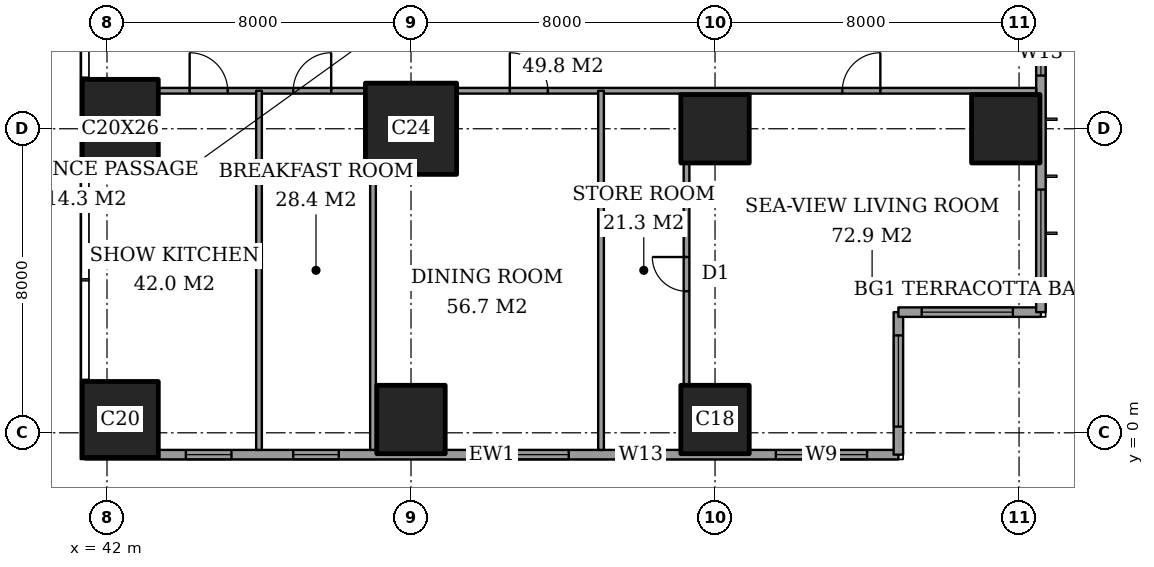
"""IFC4 building model, lengths in metres.
Left out: names, types, materials, properties, quantities, classifications, styles, units other than length and angle.
Written with IfcOpenShell. Run it as: python <this file> out.ifc"""

import sys

from ifc_helpers import new_model, si_unit, direction, frame, frame_2d, origin, origin_2d, place, context, subcontext, project, spatial, rectangle, extrude, element, fill, save


model = new_model("IFC4")
c1 = context("Model", 3, precision=1e-05, world=origin(), true_north=direction((0.0, 1.0)))
c2 = subcontext(c1, "Body", "Model", "MODEL_VIEW")
j1 = project(units=[si_unit("LENGTHUNIT", "METRE"), si_unit("PLANEANGLEUNIT", "RADIAN")], contexts=[c1])
p1 = place(None, origin())
s1 = spatial("IfcSite", under=j1, at=p1, CompositionType="ELEMENT")
p2 = place(p1, origin())
s2 = spatial("IfcBuilding", under=s1, at=p2, CompositionType="ELEMENT")
p3 = place(p2, frame((0.0, 0.0, 221.8)))
s3 = spatial("IfcBuildingStorey", under=s2, at=p3, CompositionType="ELEMENT", Elevation=221.8)
p4 = place(p3, frame((42.35, 0.35, 0.0), z_axis=(0.0, 0.0, 1.0), x_axis=(1.0, 0.0, 0.0)))
e1 = element("IfcColumn", 1, at=p4, inside=s3, PredefinedType="COLUMN", context=c2, shape_type="SweptSolid", body=[
    extrude(rectangle(XDim=2.0, YDim=2.0, at=origin_2d()), origin(), (0.0, 0.0, 1.0), 3.6),
])
p5 = place(p3, frame((42.35, 8.0, 0.0), z_axis=(0.0, 0.0, 1.0), x_axis=(1.0, 0.0, 0.0)))
e2 = element("IfcColumn", 2, at=p5, inside=s3, PredefinedType="COLUMN", context=c2, shape_type="SweptSolid", body=[
    extrude(rectangle(XDim=2.0, YDim=2.6, at=origin_2d()), origin(), (0.0, 0.0, 1.0), 3.6),
])
p6 = place(p3, frame((50.0, 0.35, 0.0), z_axis=(0.0, 0.0, 1.0), x_axis=(1.0, 0.0, 0.0)))
e3 = element("IfcColumn", 3, at=p6, inside=s3, PredefinedType="COLUMN", context=c2, shape_type="SweptSolid", body=[
    extrude(rectangle(XDim=1.8, YDim=1.8, at=origin_2d()), origin(), (0.0, 0.0, 1.0), 3.6),
])
p7 = place(p3, frame((50.0, 8.0, 0.0), z_axis=(0.0, 0.0, 1.0), x_axis=(1.0, 0.0, 0.0)))
e4 = element("IfcColumn", 4, at=p7, inside=s3, PredefinedType="COLUMN", context=c2, shape_type="SweptSolid", body=[
    extrude(rectangle(XDim=2.4, YDim=2.4, at=origin_2d()), origin(), (0.0, 0.0, 1.0), 3.6),
])
for number, where, z_axis, x_axis in (
    (5, (58.0, 0.35, 0.0), (0.0, 0.0, 1.0), (1.0, 0.0, 0.0)),
    (6, (58.0, 8.0, 0.0), (0.0, 0.0, 1.0), (1.0, 0.0, 0.0)),
    (7, (65.65, 8.0, 0.0), (0.0, 0.0, 1.0), (1.0, 0.0, 0.0)),
):
    element("IfcColumn", number, at=place(p3, frame(where, z_axis=z_axis, x_axis=x_axis)), inside=s3, PredefinedType="COLUMN", context=c2, shape_type="SweptSolid", body=[
        extrude(rectangle(XDim=1.8, YDim=1.8, at=origin_2d()), origin(), (0.0, 0.0, 1.0), 3.6),
    ])
p8 = place(p3, frame((41.425, -0.575, 0.0), z_axis=(0.0, 0.0, 1.0), x_axis=(1.0, 0.0, 0.0)))
e8 = element("IfcWall", 8, at=p8, inside=s3, PredefinedType="SOLIDWALL", context=c2, shape_type="SweptSolid", body=[
    extrude(rectangle(XDim=21.4, YDim=0.25, at=frame_2d((10.7, 0.0))), origin(), (0.0, 0.0, 1.0), 3.6),
])
p9 = place(p8, frame((2.65, 0.0, 0.2)))
e9 = element("IfcOpeningElement", 9, at=p9, cuts=e8, PredefinedType="OPENING", context=c2, shape_type="SweptSolid", body=[
    extrude(rectangle(XDim=1.2, YDim=2.4, at=frame_2d((0.6, 1.2))), frame((0.0, 0.135, 0.0), z_axis=(0.0, -1.0, 0.0), x_axis=(1.0, 0.0, 0.0)), (0.0, 0.0, 1.0), 0.27),
])
p10 = place(p8, frame((5.475, 0.0, 0.2)))
e10 = element("IfcOpeningElement", 10, at=p10, cuts=e8, PredefinedType="OPENING", context=c2, shape_type="SweptSolid", body=[
    extrude(rectangle(XDim=1.2, YDim=2.4, at=frame_2d((0.6, 1.2))), frame((0.0, 0.135, 0.0), z_axis=(0.0, -1.0, 0.0), x_axis=(1.0, 0.0, 0.0)), (0.0, 0.0, 1.0), 0.27),
])
p11 = place(p8, frame((10.325, 0.0, 0.2)))
e11 = element("IfcOpeningElement", 11, at=p11, cuts=e8, PredefinedType="OPENING", context=c2, shape_type="SweptSolid", body=[
    extrude(rectangle(XDim=2.4, YDim=2.4, at=frame_2d((1.2, 1.2))), frame((0.0, 0.135, 0.0), z_axis=(0.0, -1.0, 0.0), x_axis=(1.0, 0.0, 0.0)), (0.0, 0.0, 1.0), 0.27),
])
p12 = place(p8, frame((14.025, 0.0, 0.2)))
e12 = element("IfcOpeningElement", 12, at=p12, cuts=e8, PredefinedType="OPENING", context=c2, shape_type="SweptSolid", body=[
    extrude(rectangle(XDim=1.2, YDim=2.4, at=frame_2d((0.6, 1.2))), frame((0.0, 0.135, 0.0), z_axis=(0.0, -1.0, 0.0), x_axis=(1.0, 0.0, 0.0)), (0.0, 0.0, 1.0), 0.27),
])
p13 = place(p8, frame((18.175, 0.0, 0.2)))
e13 = element("IfcOpeningElement", 13, at=p13, cuts=e8, PredefinedType="OPENING", context=c2, shape_type="SweptSolid", body=[
    extrude(rectangle(XDim=2.4, YDim=2.4, at=frame_2d((1.2, 1.2))), frame((0.0, 0.135, 0.0), z_axis=(0.0, -1.0, 0.0), x_axis=(1.0, 0.0, 0.0)), (0.0, 0.0, 1.0), 0.27),
])
p14 = place(p3, frame((62.825, -0.575, 0.0), z_axis=(0.0, 0.0, 1.0), x_axis=(0.0, 1.0, 0.0)))
e14 = element("IfcWall", 14, at=p14, inside=s3, PredefinedType="SOLIDWALL", context=c2, shape_type="SweptSolid", body=[
    extrude(rectangle(XDim=3.75, YDim=0.25, at=frame_2d((1.875, 0.0))), origin(), (0.0, 0.0, 1.0), 3.6),
])
p15 = place(p14, frame((0.738, 0.0, 0.2)))
e15 = element("IfcOpeningElement", 15, at=p15, cuts=e14, PredefinedType="OPENING", context=c2, shape_type="SweptSolid", body=[
    extrude(rectangle(XDim=2.4, YDim=2.4, at=frame_2d((1.2, 1.2))), frame((0.0, 0.135, 0.0), z_axis=(0.0, -1.0, 0.0), x_axis=(1.0, 0.0, 0.0)), (0.0, 0.0, 1.0), 0.27),
])
p16 = place(p3, frame((62.825, 3.175, 0.0), z_axis=(0.0, 0.0, 1.0), x_axis=(1.0, 0.0, 0.0)))
e16 = element("IfcWall", 16, at=p16, inside=s3, PredefinedType="SOLIDWALL", context=c2, shape_type="SweptSolid", body=[
    extrude(rectangle(XDim=3.75, YDim=0.25, at=frame_2d((1.875, 0.0))), origin(), (0.0, 0.0, 1.0), 3.6),
])
p17 = place(p16, frame((0.613, 0.0, 0.2)))
e17 = element("IfcOpeningElement", 17, at=p17, cuts=e16, PredefinedType="OPENING", context=c2, shape_type="SweptSolid", body=[
    extrude(rectangle(XDim=2.4, YDim=2.4, at=frame_2d((1.2, 1.2))), frame((0.0, 0.135, 0.0), z_axis=(0.0, -1.0, 0.0), x_axis=(1.0, 0.0, 0.0)), (0.0, 0.0, 1.0), 0.27),
])
p18 = place(p3, frame((66.575, 3.175, 0.0), z_axis=(0.0, 0.0, 1.0), x_axis=(0.0, 1.0, 0.0)))
e18 = element("IfcWall", 18, at=p18, inside=s3, PredefinedType="SOLIDWALL", context=c2, shape_type="SweptSolid", body=[
    extrude(rectangle(XDim=41.65, YDim=0.25, at=frame_2d((20.825, 0.0))), origin(), (0.0, 0.0, 1.0), 3.6),
])
p19 = place(p18, frame((0.825, 0.0, 0.2)))
e19 = element("IfcOpeningElement", 19, at=p19, cuts=e18, PredefinedType="OPENING", context=c2, shape_type="SweptSolid", body=[
    extrude(rectangle(XDim=2.4, YDim=2.4, at=frame_2d((1.2, 1.2))), frame((0.0, 0.135, 0.0), z_axis=(0.0, -1.0, 0.0), x_axis=(1.0, 0.0, 0.0)), (0.0, 0.0, 1.0), 0.27),
])
p20 = place(p18, frame((6.225, 0.0, 0.2)))
e20 = element("IfcOpeningElement", 20, at=p20, cuts=e18, PredefinedType="OPENING", context=c2, shape_type="SweptSolid", body=[
    extrude(rectangle(XDim=1.2, YDim=2.4, at=frame_2d((0.6, 1.2))), frame((0.0, 0.135, 0.0), z_axis=(0.0, -1.0, 0.0), x_axis=(1.0, 0.0, 0.0)), (0.0, 0.0, 1.0), 0.27),
])
p21 = place(p18, frame((8.675, 0.0, 0.2)))
e21 = element("IfcOpeningElement", 21, at=p21, cuts=e18, PredefinedType="OPENING", context=c2, shape_type="SweptSolid", body=[
    extrude(rectangle(XDim=2.4, YDim=2.4, at=frame_2d((1.2, 1.2))), frame((0.0, 0.135, 0.0), z_axis=(0.0, -1.0, 0.0), x_axis=(1.0, 0.0, 0.0)), (0.0, 0.0, 1.0), 0.27),
])
p22 = place(p18, frame((15.675, 0.0, 0.2)))
e22 = element("IfcOpeningElement", 22, at=p22, cuts=e18, PredefinedType="OPENING", context=c2, shape_type="SweptSolid", body=[
    extrude(rectangle(XDim=2.4, YDim=2.4, at=frame_2d((1.2, 1.2))), frame((0.0, 0.135, 0.0), z_axis=(0.0, -1.0, 0.0), x_axis=(1.0, 0.0, 0.0)), (0.0, 0.0, 1.0), 0.27),
])
p23 = place(p18, frame((23.575, 0.0, 0.2)))
e23 = element("IfcOpeningElement", 23, at=p23, cuts=e18, PredefinedType="OPENING", context=c2, shape_type="SweptSolid", body=[
    extrude(rectangle(XDim=2.4, YDim=2.4, at=frame_2d((1.2, 1.2))), frame((0.0, 0.135, 0.0), z_axis=(0.0, -1.0, 0.0), x_axis=(1.0, 0.0, 0.0)), (0.0, 0.0, 1.0), 0.27),
])
p24 = place(p18, frame((30.775, 0.0, 0.2)))
e24 = element("IfcOpeningElement", 24, at=p24, cuts=e18, PredefinedType="OPENING", context=c2, shape_type="SweptSolid", body=[
    extrude(rectangle(XDim=2.4, YDim=2.4, at=frame_2d((1.2, 1.2))), frame((0.0, 0.135, 0.0), z_axis=(0.0, -1.0, 0.0), x_axis=(1.0, 0.0, 0.0)), (0.0, 0.0, 1.0), 0.27),
])
p25 = place(p18, frame((34.55, 0.0, 0.2)))
e25 = element("IfcOpeningElement", 25, at=p25, cuts=e18, PredefinedType="OPENING", context=c2, shape_type="SweptSolid", body=[
    extrude(rectangle(XDim=1.2, YDim=2.4, at=frame_2d((0.6, 1.2))), frame((0.0, 0.135, 0.0), z_axis=(0.0, -1.0, 0.0), x_axis=(1.0, 0.0, 0.0)), (0.0, 0.0, 1.0), 0.27),
])
p26 = place(p18, frame((38.425, 0.0, 0.2)))
e26 = element("IfcOpeningElement", 26, at=p26, cuts=e18, PredefinedType="OPENING", context=c2, shape_type="SweptSolid", body=[
    extrude(rectangle(XDim=2.4, YDim=2.4, at=frame_2d((1.2, 1.2))), frame((0.0, 0.135, 0.0), z_axis=(0.0, -1.0, 0.0), x_axis=(1.0, 0.0, 0.0)), (0.0, 0.0, 1.0), 0.27),
])
p27 = place(p3, frame((43.35, 9.0, 0.0), z_axis=(0.0, 0.0, 1.0), x_axis=(1.0, 0.0, 0.0)))
e27 = element("IfcWall", 27, at=p27, inside=s3, PredefinedType="PARTITIONING", context=c2, shape_type="SweptSolid", body=[
    extrude(rectangle(XDim=5.45, YDim=0.15, at=frame_2d((2.725, 0.0))), origin(), (0.0, 0.0, 1.0), 3.25),
])
p28 = place(p27, frame((3.55, 0.0, 0.0)))
e28 = element("IfcOpeningElement", 28, at=p28, cuts=e27, PredefinedType="OPENING", context=c2, shape_type="SweptSolid", body=[
    extrude(rectangle(XDim=1.0, YDim=2.1, at=frame_2d((0.5, 1.05))), frame((0.0, 0.085, 0.0), z_axis=(0.0, -1.0, 0.0), x_axis=(1.0, 0.0, 0.0)), (0.0, 0.0, 1.0), 0.17),
])
p29 = place(p27, frame((0.825, 0.0, 0.0)))
e29 = element("IfcOpeningElement", 29, at=p29, cuts=e27, PredefinedType="OPENING", context=c2, shape_type="SweptSolid", body=[
    extrude(rectangle(XDim=1.0, YDim=2.1, at=frame_2d((0.5, 1.05))), frame((0.0, 0.085, 0.0), z_axis=(0.0, -1.0, 0.0), x_axis=(1.0, 0.0, 0.0)), (0.0, 0.0, 1.0), 0.17),
])
p30 = place(p3, frame((51.2, 9.0, 0.0), z_axis=(0.0, 0.0, 1.0), x_axis=(1.0, 0.0, 0.0)))
e30 = element("IfcWall", 30, at=p30, inside=s3, PredefinedType="PARTITIONING", context=c2, shape_type="SweptSolid", body=[
    extrude(rectangle(XDim=15.25, YDim=0.15, at=frame_2d((7.625, 0.0))), origin(), (0.0, 0.0, 1.0), 3.25),
])
p31 = place(p30, frame((10.15, 0.0, 0.0)))
e31 = element("IfcOpeningElement", 31, at=p31, cuts=e30, PredefinedType="OPENING", context=c2, shape_type="SweptSolid", body=[
    extrude(rectangle(XDim=1.0, YDim=2.1, at=frame_2d((0.5, 1.05))), frame((0.0, 0.085, 0.0), z_axis=(0.0, -1.0, 0.0), x_axis=(1.0, 0.0, 0.0)), (0.0, 0.0, 1.0), 0.17),
])
p32 = place(p30, frame((1.4, 0.0, 0.0)))
e32 = element("IfcOpeningElement", 32, at=p32, cuts=e30, PredefinedType="OPENING", context=c2, shape_type="SweptSolid", body=[
    extrude(rectangle(XDim=1.0, YDim=2.1, at=frame_2d((0.5, 1.05))), frame((0.0, 0.085, 0.0), z_axis=(0.0, -1.0, 0.0), x_axis=(1.0, 0.0, 0.0)), (0.0, 0.0, 1.0), 0.17),
])
p33 = place(p3, frame((46.0, -0.45, 0.0), z_axis=(0.0, 0.0, 1.0), x_axis=(0.0, 1.0, 0.0)))
e33 = element("IfcWall", 33, at=p33, inside=s3, PredefinedType="PARTITIONING", context=c2, shape_type="SweptSolid", body=[
    extrude(rectangle(XDim=9.45, YDim=0.15, at=frame_2d((4.725, 0.0))), origin(), (0.0, 0.0, 1.0), 3.25),
])
p34 = place(p3, frame((49.0, -0.45, 0.0), z_axis=(0.0, 0.0, 1.0), x_axis=(0.0, 1.0, 0.0)))
e34 = element("IfcWall", 34, at=p34, inside=s3, PredefinedType="PARTITIONING", context=c2, shape_type="SweptSolid", body=[
    extrude(rectangle(XDim=7.25, YDim=0.15, at=frame_2d((3.625, 0.0))), origin(), (0.0, 0.0, 1.0), 3.25),
])
p35 = place(p3, frame((55.0, -0.45, 0.0), z_axis=(0.0, 0.0, 1.0), x_axis=(0.0, 1.0, 0.0)))
e35 = element("IfcWall", 35, at=p35, inside=s3, PredefinedType="PARTITIONING", context=c2, shape_type="SweptSolid", body=[
    extrude(rectangle(XDim=9.45, YDim=0.15, at=frame_2d((4.725, 0.0))), origin(), (0.0, 0.0, 1.0), 3.25),
])
p36 = place(p3, frame((57.25, 1.25, 0.0), z_axis=(0.0, 0.0, 1.0), x_axis=(0.0, 1.0, 0.0)))
e36 = element("IfcWall", 36, at=p36, inside=s3, PredefinedType="PARTITIONING", context=c2, shape_type="SweptSolid", body=[
    extrude(rectangle(XDim=5.85, YDim=0.15, at=frame_2d((2.925, 0.0))), origin(), (0.0, 0.0, 1.0), 3.25),
])
p37 = place(p36, frame((2.475, 0.0, 0.0)))
e37 = element("IfcOpeningElement", 37, at=p37, cuts=e36, PredefinedType="OPENING", context=c2, shape_type="SweptSolid", body=[
    extrude(rectangle(XDim=0.9, YDim=2.1, at=frame_2d((0.45, 1.05))), frame((0.0, 0.085, 0.0), z_axis=(0.0, -1.0, 0.0), x_axis=(1.0, 0.0, 0.0)), (0.0, 0.0, 1.0), 0.17),
])
p38 = place(p9, origin())
e38 = element("IfcWindow", 38, at=p38, inside=s3, PartitioningType="SINGLE_PANEL", PredefinedType="WINDOW", context=c2, shape_type="SweptSolid", body=[
    extrude(rectangle(XDim=1.2, YDim=2.4, at=frame_2d((0.6, 1.2))), frame((0.0, 0.03, 0.0), z_axis=(0.0, -1.0, 0.0), x_axis=(1.0, 0.0, 0.0)), (0.0, 0.0, 1.0), 0.06),
])
fill(e9, e38)
p39 = place(p10, origin())
e39 = element("IfcWindow", 39, at=p39, inside=s3, PartitioningType="SINGLE_PANEL", PredefinedType="WINDOW", context=c2, shape_type="SweptSolid", body=[
    extrude(rectangle(XDim=1.2, YDim=2.4, at=frame_2d((0.6, 1.2))), frame((0.0, 0.03, 0.0), z_axis=(0.0, -1.0, 0.0), x_axis=(1.0, 0.0, 0.0)), (0.0, 0.0, 1.0), 0.06),
])
fill(e10, e39)
p40 = place(p11, origin())
e40 = element("IfcWindow", 40, at=p40, inside=s3, PartitioningType="SINGLE_PANEL", PredefinedType="WINDOW", context=c2, shape_type="SweptSolid", body=[
    extrude(rectangle(XDim=2.4, YDim=2.4, at=frame_2d((1.2, 1.2))), frame((0.0, 0.03, 0.0), z_axis=(0.0, -1.0, 0.0), x_axis=(1.0, 0.0, 0.0)), (0.0, 0.0, 1.0), 0.06),
])
fill(e11, e40)
p41 = place(p12, origin())
e41 = element("IfcWindow", 41, at=p41, inside=s3, PartitioningType="SINGLE_PANEL", PredefinedType="WINDOW", context=c2, shape_type="SweptSolid", body=[
    extrude(rectangle(XDim=1.2, YDim=2.4, at=frame_2d((0.6, 1.2))), frame((0.0, 0.03, 0.0), z_axis=(0.0, -1.0, 0.0), x_axis=(1.0, 0.0, 0.0)), (0.0, 0.0, 1.0), 0.06),
])
fill(e12, e41)
p42 = place(p13, origin())
e42 = element("IfcWindow", 42, at=p42, inside=s3, PartitioningType="SINGLE_PANEL", PredefinedType="WINDOW", context=c2, shape_type="SweptSolid", body=[
    extrude(rectangle(XDim=2.4, YDim=2.4, at=frame_2d((1.2, 1.2))), frame((0.0, 0.03, 0.0), z_axis=(0.0, -1.0, 0.0), x_axis=(1.0, 0.0, 0.0)), (0.0, 0.0, 1.0), 0.06),
])
fill(e13, e42)
p43 = place(p15, origin())
e43 = element("IfcWindow", 43, at=p43, inside=s3, PartitioningType="SINGLE_PANEL", PredefinedType="WINDOW", context=c2, shape_type="SweptSolid", body=[
    extrude(rectangle(XDim=2.4, YDim=2.4, at=frame_2d((1.2, 1.2))), frame((0.0, 0.03, 0.0), z_axis=(0.0, -1.0, 0.0), x_axis=(1.0, 0.0, 0.0)), (0.0, 0.0, 1.0), 0.06),
])
fill(e15, e43)
p44 = place(p17, origin())
e44 = element("IfcWindow", 44, at=p44, inside=s3, PartitioningType="SINGLE_PANEL", PredefinedType="WINDOW", context=c2, shape_type="SweptSolid", body=[
    extrude(rectangle(XDim=2.4, YDim=2.4, at=frame_2d((1.2, 1.2))), frame((0.0, 0.03, 0.0), z_axis=(0.0, -1.0, 0.0), x_axis=(1.0, 0.0, 0.0)), (0.0, 0.0, 1.0), 0.06),
])
fill(e17, e44)
p45 = place(p19, origin())
e45 = element("IfcWindow", 45, at=p45, inside=s3, PartitioningType="SINGLE_PANEL", PredefinedType="WINDOW", context=c2, shape_type="SweptSolid", body=[
    extrude(rectangle(XDim=2.4, YDim=2.4, at=frame_2d((1.2, 1.2))), frame((0.0, 0.03, 0.0), z_axis=(0.0, -1.0, 0.0), x_axis=(1.0, 0.0, 0.0)), (0.0, 0.0, 1.0), 0.06),
])
fill(e19, e45)
p46 = place(p20, origin())
e46 = element("IfcWindow", 46, at=p46, inside=s3, PartitioningType="SINGLE_PANEL", PredefinedType="WINDOW", context=c2, shape_type="SweptSolid", body=[
    extrude(rectangle(XDim=1.2, YDim=2.4, at=frame_2d((0.6, 1.2))), frame((0.0, 0.03, 0.0), z_axis=(0.0, -1.0, 0.0), x_axis=(1.0, 0.0, 0.0)), (0.0, 0.0, 1.0), 0.06),
])
fill(e20, e46)
p47 = place(p31, origin())
e47 = element("IfcDoor", 47, at=p47, inside=s3, OperationType="SINGLE_SWING_LEFT", PredefinedType="DOOR", context=c2, shape_type="SweptSolid", body=[
    extrude(rectangle(XDim=1.0, YDim=2.1, at=frame_2d((0.5, 1.05))), frame((0.0, 0.025, 0.0), z_axis=(0.0, -1.0, 0.0), x_axis=(1.0, 0.0, 0.0)), (0.0, 0.0, 1.0), 0.05),
])
fill(e31, e47)
p48 = place(p37, origin())
e48 = element("IfcDoor", 48, at=p48, inside=s3, OperationType="SINGLE_SWING_LEFT", PredefinedType="DOOR", context=c2, shape_type="SweptSolid", body=[
    extrude(rectangle(XDim=0.9, YDim=2.1, at=frame_2d((0.45, 1.05))), frame((0.0, 0.025, 0.0), z_axis=(0.0, -1.0, 0.0), x_axis=(1.0, 0.0, 0.0)), (0.0, 0.0, 1.0), 0.05),
])
fill(e37, e48)
p49 = place(p32, origin())
e49 = element("IfcDoor", 49, at=p49, inside=s3, OperationType="SINGLE_SWING_RIGHT", PredefinedType="DOOR", context=c2, shape_type="SweptSolid", body=[
    extrude(rectangle(XDim=1.0, YDim=2.1, at=frame_2d((0.5, 1.05))), frame((0.0, 0.025, 0.0), z_axis=(0.0, -1.0, 0.0), x_axis=(1.0, 0.0, 0.0)), (0.0, 0.0, 1.0), 0.05),
])
fill(e32, e49)
p50 = place(p28, origin())
e50 = element("IfcDoor", 50, at=p50, inside=s3, OperationType="SINGLE_SWING_LEFT", PredefinedType="DOOR", context=c2, shape_type="SweptSolid", body=[
    extrude(rectangle(XDim=1.0, YDim=2.1, at=frame_2d((0.5, 1.05))), frame((0.0, 0.025, 0.0), z_axis=(0.0, -1.0, 0.0), x_axis=(1.0, 0.0, 0.0)), (0.0, 0.0, 1.0), 0.05),
])
fill(e28, e50)
p51 = place(p29, origin())
e51 = element("IfcDoor", 51, at=p51, inside=s3, OperationType="SINGLE_SWING_RIGHT", PredefinedType="DOOR", context=c2, shape_type="SweptSolid", body=[
    extrude(rectangle(XDim=1.0, YDim=2.1, at=frame_2d((0.5, 1.05))), frame((0.0, 0.025, 0.0), z_axis=(0.0, -1.0, 0.0), x_axis=(1.0, 0.0, 0.0)), (0.0, 0.0, 1.0), 0.05),
])
fill(e29, e51)
save(model, sys.argv[1])
